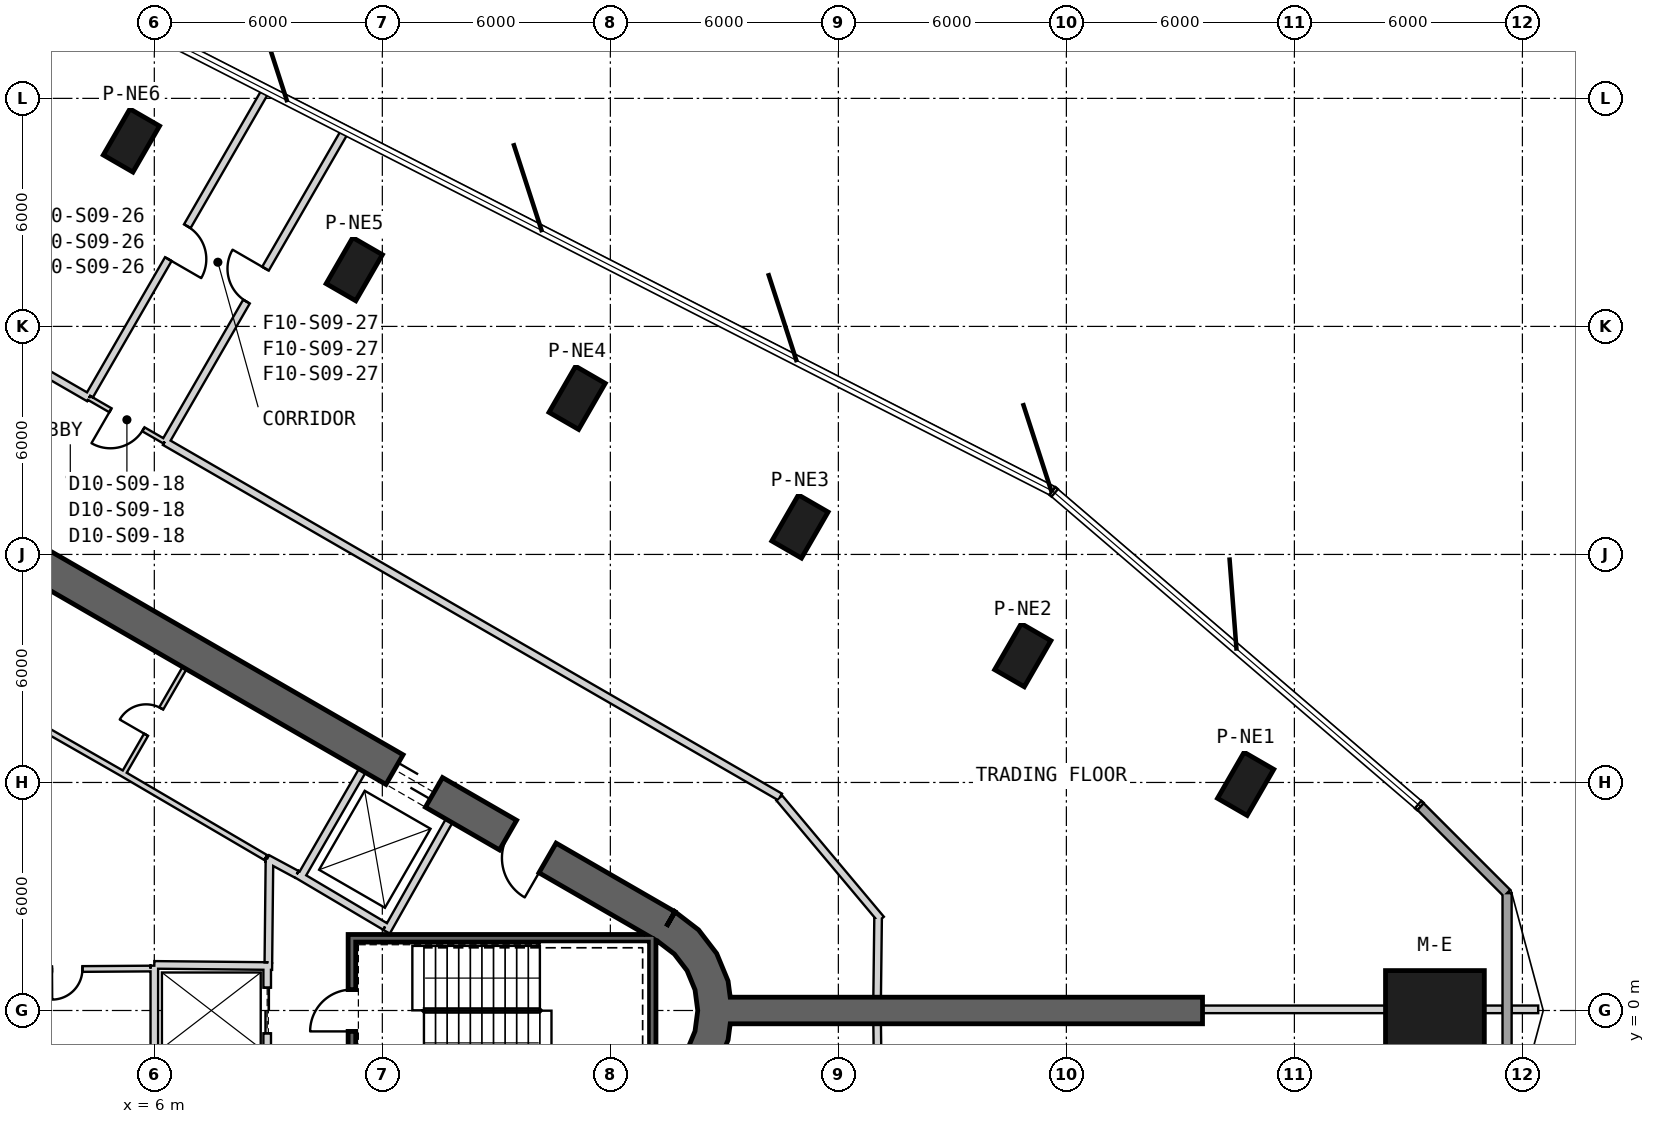
"""IFC4 building model, lengths in metres.
Left out: names, types, materials, properties, quantities, classifications, styles, units other than length and angle.
Written with IfcOpenShell. Run it as: python <this file> out.ifc"""

import sys

from ifc_helpers import new_model, si_unit, direction, frame, frame_2d, origin, origin_2d, place, context, subcontext, project, spatial, polyline, rectangle, outline, extrude, element, fill, save


model = new_model("IFC4")
c1 = context("Model", 3, precision=1e-05, world=origin(), true_north=direction((0.0, 1.0)))
c2 = subcontext(c1, "Body", "Model", "MODEL_VIEW")
j1 = project(units=[si_unit("LENGTHUNIT", "METRE"), si_unit("PLANEANGLEUNIT", "RADIAN")], contexts=[c1])
p1 = place(None, origin())
s1 = spatial("IfcSite", under=j1, at=p1, CompositionType="ELEMENT")
p2 = place(p1, origin())
s2 = spatial("IfcBuilding", under=s1, at=p2, CompositionType="ELEMENT")
p3 = place(p2, frame((0.0, 0.0, 169.2)))
s3 = spatial("IfcBuildingStorey", under=s2, at=p3, CompositionType="ELEMENT", Elevation=169.2)
p4 = place(p3, frame((39.698, 0.0, 0.0), z_axis=(0.0, 0.0, 1.0), x_axis=(1.0, 0.0, 0.0)))
e1 = element("IfcColumn", 1, at=p4, inside=s3, PredefinedType="COLUMN", context=c2, shape_type="SweptSolid", body=[
    extrude(rectangle(XDim=2.6, YDim=2.1, at=origin_2d()), origin(), (0.0, 0.0, 1.0), 4.0),
])
for number, where, z_axis, x_axis in (
    (2, (34.717, 5.964, -0.3), (0.0, 0.0, 1.0), (0.5, 0.866, 0.0)),
    (3, (28.853, 9.35, -0.3), (0.0, 0.0, 1.0), (0.5, 0.866, 0.0)),
    (4, (22.99, 12.735, -0.3), (0.0, 0.0, 1.0), (0.5, 0.866, 0.0)),
    (5, (17.125, 16.121, -0.3), (0.0, 0.0, 1.0), (0.5, 0.866, 0.0)),
    (6, (11.262, 19.506, -0.3), (0.0, 0.0, 1.0), (0.5, 0.866, 0.0)),
    (7, (5.398, 22.892, -0.3), (0.0, 0.0, 1.0), (0.5, 0.866, 0.0)),
):
    element("IfcColumn", number, at=place(p3, frame(where, z_axis=z_axis, x_axis=x_axis)), inside=s3, PredefinedType="COLUMN", context=c2, shape_type="SweptSolid", body=[
        extrude(rectangle(XDim=1.4, YDim=0.9, at=origin_2d()), origin(), (0.0, 0.0, 1.0), 4.3),
    ])
p5 = place(p3, frame((19.475, 2.208, 0.0), z_axis=(0.0, 0.0, 1.0), x_axis=(-0.866028369851, 0.499994862586, 0.0)))
e8 = element("IfcWall", 8, at=p5, inside=s3, PredefinedType="SHEAR", context=c2, shape_type="SweptSolid", body=[
    extrude(rectangle(XDim=31.523, YDim=0.9, at=frame_2d((15.762, 0.0))), origin(), (0.0, 0.0, 1.0), 4.0),
])
p6 = place(p5, frame((7.062, 0.0, 0.0)))
e9 = element("IfcOpeningElement", 9, at=p6, cuts=e8, PredefinedType="OPENING", context=c2, shape_type="SweptSolid", body=[
    extrude(rectangle(XDim=1.2, YDim=2.4, at=frame_2d((0.6, 1.2))), frame((0.0, 0.46, 0.0), z_axis=(0.0, -1.0, 0.0), x_axis=(1.0, 0.0, 0.0)), (0.0, 0.0, 1.0), 0.92),
])
p7 = place(p5, frame((3.612, 0.0, 0.0)))
e10 = element("IfcOpeningElement", 10, at=p7, cuts=e8, PredefinedType="OPENING", context=c2, shape_type="SweptSolid", body=[
    extrude(rectangle(XDim=1.2, YDim=2.4, at=frame_2d((0.6, 1.2))), frame((0.0, 0.46, 0.0), z_axis=(0.0, -1.0, 0.0), x_axis=(1.0, 0.0, 0.0)), (0.0, 0.0, 1.0), 0.92),
])
p8 = place(p5, frame((26.712, 0.0, 0.0)))
e11 = element("IfcOpeningElement", 11, at=p8, cuts=e8, PredefinedType="OPENING", context=c2, shape_type="SweptSolid", body=[
    extrude(rectangle(XDim=1.2, YDim=2.4, at=frame_2d((0.6, 1.2))), frame((0.0, 0.46, 0.0), z_axis=(0.0, -1.0, 0.0), x_axis=(1.0, 0.0, 0.0)), (0.0, 0.0, 1.0), 0.92),
])
p9 = place(p3, origin())
e12 = element("IfcWall", 12, at=p9, inside=s3, PredefinedType="SHEAR", context=c2, shape_type="SweptSolid", body=[
    extrude(outline(polyline([(19.7, -2.598), (20.321, -2.121), (20.798, -1.5), (21.098, -0.777), (21.2, 0.0), (21.098, 0.777), (20.798, 1.5), (20.321, 2.121), (19.7, 2.598), (19.25, 1.819), (19.685, 1.485), (20.019, 1.05), (20.229, 0.543), (20.3, 0.0), (20.229, -0.543), (20.019, -1.05), (19.685, -1.485), (19.25, -1.819), (19.7, -2.598)])), origin(), (0.0, 0.0, 1.0), 4.0),
])
p10 = place(p3, frame((21.15, 0.0, 0.0), z_axis=(0.0, 0.0, 1.0), x_axis=(1.0, 0.0, 0.0)))
e13 = element("IfcWall", 13, at=p10, inside=s3, PredefinedType="SHEAR", context=c2, shape_type="SweptSolid", body=[
    extrude(rectangle(XDim=12.433, YDim=0.7, at=frame_2d((6.216, 0.0))), origin(), (0.0, 0.0, 1.0), 4.0),
])
p11 = place(p3, frame((41.597, -3.087, 0.0), z_axis=(0.0, 0.0, 1.0), x_axis=(0.0, 1.0, 0.0)))
e14 = element("IfcWall", 14, at=p11, inside=s3, PredefinedType="SOLIDWALL", context=c2, shape_type="SweptSolid", body=[
    extrude(rectangle(XDim=6.175, YDim=0.24, at=frame_2d((3.087, 0.0))), origin(), (0.0, 0.0, 1.0), 3.7),
])
p12 = place(p3, frame((41.597, 3.087, 0.0), z_axis=(0.0, 0.0, 1.0), x_axis=(-0.70714464399, 0.707068916356, 0.0)))
e15 = element("IfcWall", 15, at=p12, inside=s3, PredefinedType="SOLIDWALL", context=c2, shape_type="SweptSolid", body=[
    extrude(rectangle(XDim=3.224, YDim=0.24, at=frame_2d((1.612, 0.0))), origin(), (0.0, 0.0, 1.0), 3.7),
])
p13 = place(p3, frame((9.847, 3.495, 0.0), z_axis=(0.0, 0.0, 1.0), x_axis=(0.499984717929, 0.866034226713, 0.0)))
e16 = element("IfcWall", 16, at=p13, inside=s3, PredefinedType="PLUMBINGWALL", context=c2, shape_type="SweptSolid", body=[
    extrude(rectangle(XDim=3.25, YDim=0.2, at=frame_2d((1.625, 0.0))), origin(), (0.0, 0.0, 1.0), 3.7),
])
p14 = place(p3, frame((12.11, 2.073, 0.0), z_axis=(0.0, 0.0, 1.0), x_axis=(0.49196600604, 0.870614408852, 0.0)))
e17 = element("IfcWall", 17, at=p14, inside=s3, PredefinedType="PLUMBINGWALL", context=c2, shape_type="SweptSolid", body=[
    extrude(rectangle(XDim=3.35, YDim=0.2, at=frame_2d((1.675, 0.0))), origin(), (0.0, 0.0, 1.0), 3.7),
])
p15 = place(p3, frame((12.073, 2.211, 0.0), z_axis=(0.0, 0.0, 1.0), x_axis=(-0.860414880418, 0.509594185166, 0.0)))
e18 = element("IfcWall", 18, at=p15, inside=s3, PredefinedType="PLUMBINGWALL", context=c2, shape_type="SweptSolid", body=[
    extrude(rectangle(XDim=2.7, YDim=0.2, at=frame_2d((1.35, 0.0))), origin(), (0.0, 0.0, 1.0), 3.7),
])
p16 = place(p3, frame((19.2, 1.9, -0.3), z_axis=(0.0, 0.0, 1.0), x_axis=(-1.0, 0.0, 0.0)))
e19 = element("IfcWall", 19, at=p16, inside=s3, PredefinedType="SHEAR", context=c2, shape_type="SweptSolid", body=[
    extrude(rectangle(XDim=8.1, YDim=0.2, at=frame_2d((4.05, 0.0))), origin(), (0.0, 0.0, 1.0), 4.0),
])
p17 = place(p3, frame((19.1, -2.0, -0.3), z_axis=(0.0, 0.0, 1.0), x_axis=(0.0, 1.0, 0.0)))
e20 = element("IfcWall", 20, at=p17, inside=s3, PredefinedType="SHEAR", context=c2, shape_type="SweptSolid", body=[
    extrude(rectangle(XDim=3.8, YDim=0.2, at=frame_2d((1.9, 0.0))), origin(), (0.0, 0.0, 1.0), 4.0),
])
p18 = place(p3, frame((11.2, -1.8, -0.3), z_axis=(0.0, 0.0, 1.0), x_axis=(0.0, 1.0, 0.0)))
e21 = element("IfcWall", 21, at=p18, inside=s3, PredefinedType="SHEAR", context=c2, shape_type="SweptSolid", body=[
    extrude(rectangle(XDim=3.6, YDim=0.2, at=frame_2d((1.8, 0.0))), origin(), (0.0, 0.0, 1.0), 4.0),
])
p19 = place(p18, frame((1.25, 0.0, 0.3)))
e22 = element("IfcOpeningElement", 22, at=p19, cuts=e21, PredefinedType="OPENING", context=c2, shape_type="SweptSolid", body=[
    extrude(rectangle(XDim=1.1, YDim=2.1, at=frame_2d((0.55, 1.05))), frame((0.0, 0.11, 0.0), z_axis=(0.0, -1.0, 0.0), x_axis=(1.0, 0.0, 0.0)), (0.0, 0.0, 1.0), 0.22),
])
p20 = place(p3, frame((8.97, 1.2, 0.0), z_axis=(0.0, 0.0, 1.0), x_axis=(0.0, -1.0, 0.0)))
e23 = element("IfcWall", 23, at=p20, inside=s3, PredefinedType="PLUMBINGWALL", context=c2, shape_type="SweptSolid", body=[
    extrude(rectangle(XDim=2.4, YDim=0.2, at=frame_2d((1.2, 0.0))), origin(), (0.0, 0.0, 1.0), 3.7),
])
p21 = place(p20, frame((0.6, 0.0, 0.0)))
e24 = element("IfcOpeningElement", 24, at=p21, cuts=e23, PredefinedType="OPENING", context=c2, shape_type="SweptSolid", body=[
    extrude(rectangle(XDim=1.2, YDim=2.4, at=frame_2d((0.6, 1.2))), frame((0.0, 0.11, 0.0), z_axis=(0.0, -1.0, 0.0), x_axis=(1.0, 0.0, 0.0)), (0.0, 0.0, 1.0), 0.22),
])
p22 = place(p3, frame((6.0, 1.2, 0.0), z_axis=(0.0, 0.0, 1.0), x_axis=(0.999949988, -0.010001074852, 0.0)))
e25 = element("IfcWall", 25, at=p22, inside=s3, PredefinedType="PLUMBINGWALL", context=c2, shape_type="SweptSolid", body=[
    extrude(rectangle(XDim=3.1, YDim=0.2, at=frame_2d((1.55, 0.0))), origin(), (0.0, 0.0, 1.0), 3.7),
])
p23 = place(p3, frame((6.0, -1.1, 0.0), z_axis=(0.0, 0.0, 1.0), x_axis=(0.0, 1.0, 0.0)))
e26 = element("IfcWall", 26, at=p23, inside=s3, PredefinedType="PLUMBINGWALL", context=c2, shape_type="SweptSolid", body=[
    extrude(rectangle(XDim=2.28, YDim=0.2, at=frame_2d((1.14, 0.0))), origin(), (0.0, 0.0, 1.0), 3.7),
])
p24 = place(p3, frame((5.17, 6.195, 0.0), z_axis=(0.0, 0.0, 1.0), x_axis=(0.499984717929, 0.866034226713, 0.0)))
e27 = element("IfcWall", 27, at=p24, inside=s3, PredefinedType="PARTITIONING", context=c2, shape_type="SweptSolid", body=[
    extrude(rectangle(XDim=3.25, YDim=0.12, at=frame_2d((1.625, 0.0))), origin(), (0.0, 0.0, 1.0), 3.7),
])
p25 = place(p24, frame((1.225, 0.0, 0.0)))
e28 = element("IfcOpeningElement", 28, at=p25, cuts=e27, PredefinedType="OPENING", context=c2, shape_type="SweptSolid", body=[
    extrude(rectangle(XDim=0.8, YDim=2.1, at=frame_2d((0.4, 1.05))), frame((0.0, 0.07, 0.0), z_axis=(0.0, -1.0, 0.0), x_axis=(1.0, 0.0, 0.0)), (0.0, 0.0, 1.0), 0.14),
])
p26 = place(p3, frame((8.974, 3.999, 0.0), z_axis=(0.0, 0.0, 1.0), x_axis=(0.880917147855, -0.473270513147, 0.0)))
e29 = element("IfcWall", 29, at=p26, inside=s3, PredefinedType="PARTITIONING", context=c2, shape_type="SweptSolid", body=[
    extrude(rectangle(XDim=0.878, YDim=0.2, at=frame_2d((0.439, 0.0))), origin(), (0.0, 0.0, 1.0), 3.7),
])
p27 = place(p3, frame((8.931, 4.025, 0.0), z_axis=(0.0, 0.0, 1.0), x_axis=(-0.862666884027, 0.505772525157, 0.0)))
e30 = element("IfcWall", 30, at=p27, inside=s3, PredefinedType="PLUMBINGWALL", context=c2, shape_type="SweptSolid", body=[
    extrude(rectangle(XDim=4.372, YDim=0.15, at=frame_2d((2.186, 0.0))), origin(), (0.0, 0.0, 1.0), 3.7),
])
p28 = place(p3, frame((5.159, 6.236, 0.0), z_axis=(0.0, 0.0, 1.0), x_axis=(-0.868105023632, 0.496380567654, 0.0)))
e31 = element("IfcWall", 31, at=p28, inside=s3, PredefinedType="PLUMBINGWALL", context=c2, shape_type="SweptSolid", body=[
    extrude(rectangle(XDim=7.072, YDim=0.15, at=frame_2d((3.536, 0.0))), origin(), (0.0, 0.0, 1.0), 3.7),
])
p29 = place(p3, frame((9.001, 1.27, 0.0), z_axis=(0.0, 0.0, 1.0), x_axis=(0.01074821465, 0.999942236273, 0.0)))
e32 = element("IfcWall", 32, at=p29, inside=s3, PredefinedType="PARTITIONING", context=c2, shape_type="SweptSolid", body=[
    extrude(rectangle(XDim=2.726, YDim=0.2, at=frame_2d((1.363, 0.0))), origin(), (0.0, 0.0, 1.0), 3.7),
])
p30 = place(p3, frame((1.388, 1.074, 0.0), z_axis=(0.0, 0.0, 1.0), x_axis=(0.99997856967, 0.006546770205, 0.0)))
e33 = element("IfcWall", 33, at=p30, inside=s3, PredefinedType="PLUMBINGWALL", context=c2, shape_type="SweptSolid", body=[
    extrude(rectangle(XDim=4.512, YDim=0.15, at=frame_2d((2.256, 0.0))), origin(), (0.0, 0.0, 1.0), 3.7),
])
p31 = place(p30, frame((1.92, 0.0, 0.0)))
e34 = element("IfcOpeningElement", 34, at=p31, cuts=e33, PredefinedType="OPENING", context=c2, shape_type="SweptSolid", body=[
    extrude(rectangle(XDim=0.8, YDim=2.1, at=frame_2d((0.4, 1.05))), frame((0.0, 0.085, 0.0), z_axis=(0.0, -1.0, 0.0), x_axis=(1.0, 0.0, 0.0)), (0.0, 0.0, 1.0), 0.17),
])
p32 = place(p3, frame((6.275, 14.968, 0.0), z_axis=(0.0, 0.0, 1.0), x_axis=(-0.866053019151, 0.499952165731, 0.0)))
e35 = element("IfcWall", 35, at=p32, inside=s3, PredefinedType="PARTITIONING", context=c2, shape_type="SweptSolid", body=[
    extrude(rectangle(XDim=2.3, YDim=0.12, at=frame_2d((1.15, 0.0))), origin(), (0.0, 0.0, 1.0), 3.7),
])
p33 = place(p32, frame((0.65, 0.0, 0.0)))
e36 = element("IfcOpeningElement", 36, at=p33, cuts=e35, PredefinedType="OPENING", context=c2, shape_type="SweptSolid", body=[
    extrude(rectangle(XDim=1.0, YDim=2.1, at=frame_2d((0.5, 1.05))), frame((0.0, 0.07, 0.0), z_axis=(0.0, -1.0, 0.0), x_axis=(1.0, 0.0, 0.0)), (0.0, 0.0, 1.0), 0.14),
])
p34 = place(p3, frame((22.466, 5.62, 0.0), z_axis=(0.0, 0.0, 1.0), x_axis=(-0.866024667879, 0.500001274624, 0.0)))
e37 = element("IfcWall", 37, at=p34, inside=s3, PredefinedType="PARTITIONING", context=c2, shape_type="SweptSolid", body=[
    extrude(rectangle(XDim=18.696, YDim=0.2, at=frame_2d((9.348, 0.0))), origin(), (0.0, 0.0, 1.0), 2.88),
])
p35 = place(p3, frame((4.283, 16.118, 0.0), z_axis=(0.0, 0.0, 1.0), x_axis=(-0.866016186489, 0.500015964484, 0.0)))
e38 = element("IfcWall", 38, at=p35, inside=s3, PredefinedType="PARTITIONING", context=c2, shape_type="SweptSolid", body=[
    extrude(rectangle(XDim=12.096, YDim=0.2, at=frame_2d((6.048, 0.0))), origin(), (0.0, 0.0, 1.0), 2.88),
])
p36 = place(p3, frame((25.121, 2.403, 0.0), z_axis=(0.0, 0.0, 1.0), x_axis=(-0.642809831665, 0.766025796116, 0.0)))
e39 = element("IfcWall", 39, at=p36, inside=s3, PredefinedType="PARTITIONING", context=c2, shape_type="SweptSolid", body=[
    extrude(rectangle(XDim=4.165, YDim=0.2, at=frame_2d((2.083, 0.0))), origin(), (0.0, 0.0, 1.0), 2.78),
])
p37 = place(p3, frame((25.021, 0.35, 0.0), z_axis=(0.0, 0.0, 1.0), x_axis=(0.012014998271, 0.999927817303, 0.0)))
e40 = element("IfcWall", 40, at=p37, inside=s3, PredefinedType="PARTITIONING", context=c2, shape_type="SweptSolid", body=[
    extrude(rectangle(XDim=2.093, YDim=0.2, at=frame_2d((1.046, 0.0))), origin(), (0.0, 0.0, 1.0), 3.7),
])
p38 = place(p3, frame((25.048, -2.608, 0.0), z_axis=(0.0, 0.0, 1.0), x_axis=(-0.012000433251, 0.999927992208, 0.0)))
e41 = element("IfcWall", 41, at=p38, inside=s3, PredefinedType="PARTITIONING", context=c2, shape_type="SweptSolid", body=[
    extrude(rectangle(XDim=2.258, YDim=0.2, at=frame_2d((1.129, 0.0))), origin(), (0.0, 0.0, 1.0), 3.7),
])
p39 = place(p3, frame((8.941, 24.227, 0.0), z_axis=(0.0, 0.0, 1.0), x_axis=(-0.500002216581, -0.866024124037, 0.0)))
e42 = element("IfcWall", 42, at=p39, inside=s3, PredefinedType="PARTITIONING", context=c2, shape_type="SweptSolid", body=[
    extrude(rectangle(XDim=9.292, YDim=0.2, at=frame_2d((4.646, 0.0))), origin(), (0.0, 0.0, 1.0), 3.7),
])
p40 = place(p39, frame((4.146, 0.0, 0.0)))
e43 = element("IfcOpeningElement", 43, at=p40, cuts=e42, PredefinedType="OPENING", context=c2, shape_type="SweptSolid", body=[
    extrude(rectangle(XDim=1.0, YDim=2.1, at=frame_2d((0.5, 1.05))), frame((0.0, 0.11, 0.0), z_axis=(0.0, -1.0, 0.0), x_axis=(1.0, 0.0, 0.0)), (0.0, 0.0, 1.0), 0.22),
])
p41 = place(p3, frame((6.322, 15.01, 0.0), z_axis=(0.0, 0.0, 1.0), x_axis=(0.500005339912, 0.866022320763, 0.0)))
e44 = element("IfcWall", 44, at=p41, inside=s3, PredefinedType="PARTITIONING", context=c2, shape_type="SweptSolid", body=[
    extrude(rectangle(XDim=9.413, YDim=0.2, at=frame_2d((4.707, 0.0))), origin(), (0.0, 0.0, 1.0), 3.7),
])
p42 = place(p41, frame((4.207, 0.0, 0.0)))
e45 = element("IfcOpeningElement", 45, at=p42, cuts=e44, PredefinedType="OPENING", context=c2, shape_type="SweptSolid", body=[
    extrude(rectangle(XDim=1.0, YDim=2.1, at=frame_2d((0.5, 1.05))), frame((0.0, 0.11, 0.0), z_axis=(0.0, -1.0, 0.0), x_axis=(1.0, 0.0, 0.0)), (0.0, 0.0, 1.0), 0.22),
])
p43 = place(p3, frame((33.583, 0.03, 0.0), z_axis=(0.0, 0.0, 1.0), x_axis=(1.0, 0.0, 0.0)))
e46 = element("IfcWall", 46, at=p43, inside=s3, PredefinedType="PARTITIONING", context=c2, shape_type="SweptSolid", body=[
    extrude(rectangle(XDim=4.816, YDim=0.2, at=frame_2d((2.408, 0.0))), origin(), (0.0, 0.0, 1.0), 3.27),
])
p44 = place(p3, frame((40.998, 0.03, 0.0), z_axis=(0.0, 0.0, 1.0), x_axis=(1.0, 0.0, 0.0)))
e47 = element("IfcWall", 47, at=p44, inside=s3, PredefinedType="PARTITIONING", context=c2, shape_type="SweptSolid", body=[
    extrude(rectangle(XDim=0.479, YDim=0.2, at=frame_2d((0.239, 0.0))), origin(), (0.0, 0.0, 1.0), 3.7),
])
p45 = place(p3, frame((41.717, 0.03, 0.0), z_axis=(0.0, 0.0, 1.0), x_axis=(1.0, 0.0, 0.0)))
e48 = element("IfcWall", 48, at=p45, inside=s3, PredefinedType="PARTITIONING", context=c2, shape_type="SweptSolid", body=[
    extrude(rectangle(XDim=0.699, YDim=0.2, at=frame_2d((0.35, 0.0))), origin(), (0.0, 0.0, 1.0), 3.7),
])
p46 = place(p19, origin())
e49 = element("IfcDoor", 49, at=p46, inside=s3, OperationType="SINGLE_SWING_LEFT", PredefinedType="USERDEFINED", context=c2, shape_type="SweptSolid", body=[
    extrude(rectangle(XDim=1.1, YDim=2.1, at=frame_2d((0.55, 1.05))), frame((0.0, 0.025, 0.0), z_axis=(0.0, -1.0, 0.0), x_axis=(1.0, 0.0, 0.0)), (0.0, 0.0, 1.0), 0.05),
])
fill(e22, e49)
p47 = place(p21, origin())
e50 = element("IfcDoor", 50, at=p47, inside=s3, OperationType="SLIDING_TO_LEFT", PredefinedType="USERDEFINED", context=c2, shape_type="SweptSolid", body=[
    extrude(rectangle(XDim=1.2, YDim=2.4, at=frame_2d((0.6, 1.2))), frame((0.0, 0.025, 0.0), z_axis=(0.0, -1.0, 0.0), x_axis=(1.0, 0.0, 0.0)), (0.0, 0.0, 1.0), 0.05),
])
fill(e24, e50)
p48 = place(p31, origin())
e51 = element("IfcDoor", 51, at=p48, inside=s3, OperationType="SINGLE_SWING_RIGHT", PredefinedType="USERDEFINED", context=c2, shape_type="SweptSolid", body=[
    extrude(rectangle(XDim=0.8, YDim=2.1, at=frame_2d((0.4, 1.05))), frame((0.0, 0.025, 0.0), z_axis=(0.0, -1.0, 0.0), x_axis=(1.0, 0.0, 0.0)), (0.0, 0.0, 1.0), 0.05),
])
fill(e34, e51)
p49 = place(p25, origin())
e52 = element("IfcDoor", 52, at=p49, inside=s3, OperationType="SINGLE_SWING_LEFT", PredefinedType="USERDEFINED", context=c2, shape_type="SweptSolid", body=[
    extrude(rectangle(XDim=0.8, YDim=2.1, at=frame_2d((0.4, 1.05))), frame((0.0, 0.025, 0.0), z_axis=(0.0, -1.0, 0.0), x_axis=(1.0, 0.0, 0.0)), (0.0, 0.0, 1.0), 0.05),
])
fill(e28, e52)
p50 = place(p33, origin())
e53 = element("IfcDoor", 53, at=p50, inside=s3, OperationType="SINGLE_SWING_RIGHT", PredefinedType="NOTDEFINED", context=c2, shape_type="SweptSolid", body=[
    extrude(rectangle(XDim=1.0, YDim=2.1, at=frame_2d((0.5, 1.05))), frame((0.0, 0.025, 0.0), z_axis=(0.0, -1.0, 0.0), x_axis=(1.0, 0.0, 0.0)), (0.0, 0.0, 1.0), 0.05),
])
fill(e36, e53)
p51 = place(p40, origin())
e54 = element("IfcDoor", 54, at=p51, inside=s3, OperationType="SINGLE_SWING_LEFT", PredefinedType="USERDEFINED", context=c2, shape_type="SweptSolid", body=[
    extrude(rectangle(XDim=1.0, YDim=2.1, at=frame_2d((0.5, 1.05))), frame((0.0, 0.025, 0.0), z_axis=(0.0, -1.0, 0.0), x_axis=(1.0, 0.0, 0.0)), (0.0, 0.0, 1.0), 0.05),
])
fill(e43, e54)
p52 = place(p42, origin())
e55 = element("IfcDoor", 55, at=p52, inside=s3, OperationType="SINGLE_SWING_RIGHT", PredefinedType="USERDEFINED", context=c2, shape_type="SweptSolid", body=[
    extrude(rectangle(XDim=1.0, YDim=2.1, at=frame_2d((0.5, 1.05))), frame((0.0, 0.025, 0.0), z_axis=(0.0, -1.0, 0.0), x_axis=(1.0, 0.0, 0.0)), (0.0, 0.0, 1.0), 0.05),
])
fill(e45, e55)
p53 = place(p6, origin())
e56 = element("IfcDoor", 56, at=p53, inside=s3, OperationType="SLIDING_TO_LEFT", PredefinedType="USERDEFINED", context=c2, shape_type="SweptSolid", body=[
    extrude(rectangle(XDim=1.2, YDim=2.4, at=frame_2d((0.6, 1.2))), frame((0.0, 0.025, 0.0), z_axis=(0.0, -1.0, 0.0), x_axis=(1.0, 0.0, 0.0)), (0.0, 0.0, 1.0), 0.05),
])
fill(e9, e56)
p54 = place(p7, origin())
e57 = element("IfcDoor", 57, at=p54, inside=s3, OperationType="SINGLE_SWING_LEFT", PredefinedType="USERDEFINED", context=c2, shape_type="SweptSolid", body=[
    extrude(rectangle(XDim=1.2, YDim=2.4, at=frame_2d((0.6, 1.2))), frame((0.0, 0.025, 0.0), z_axis=(0.0, -1.0, 0.0), x_axis=(1.0, 0.0, 0.0)), (0.0, 0.0, 1.0), 0.05),
])
fill(e10, e57)
save(model, sys.argv[1])
